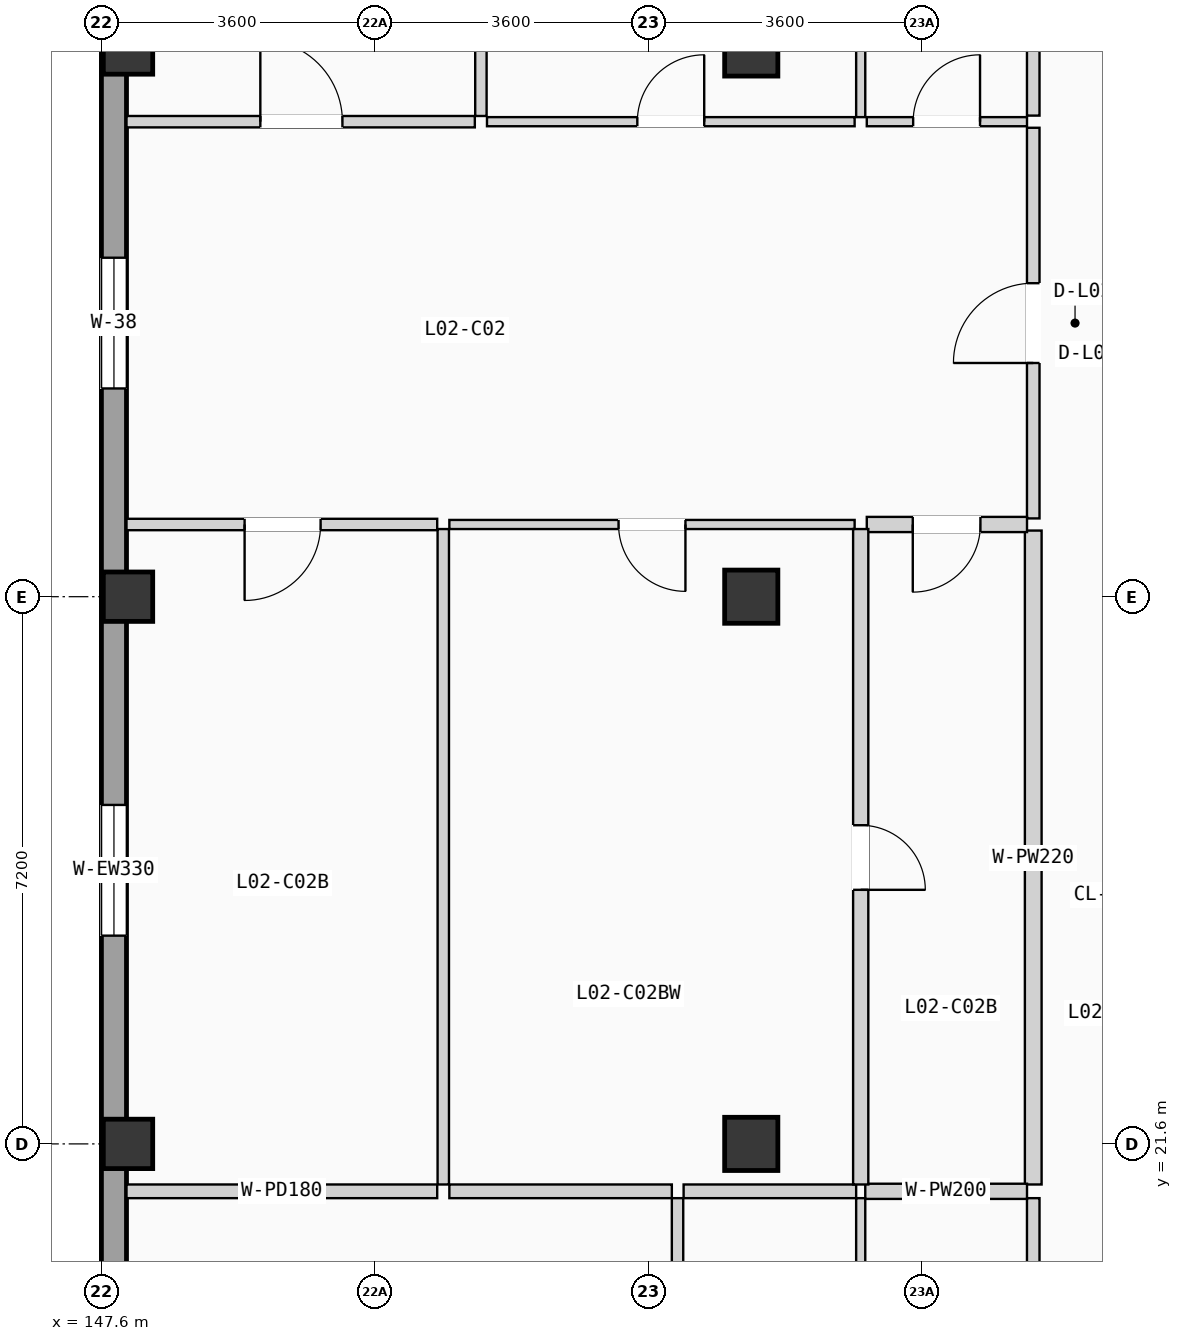
"""IFC4 building model, lengths in metres.
Left out: names, types, materials, properties, quantities, classifications, styles, units other than length and angle.
Written with IfcOpenShell. Run it as: python <this file> out.ifc"""

import sys

from ifc_helpers import new_model, si_unit, direction, frame, frame_2d, origin, origin_2d, place, context, subcontext, project, spatial, rectangle, extrude, element, fill, save


model = new_model("IFC4")
c1 = context("Model", 3, precision=1e-05, world=origin(), true_north=direction((0.0, 1.0)))
c2 = subcontext(c1, "Body", "Model", "MODEL_VIEW")
j1 = project(units=[si_unit("LENGTHUNIT", "METRE"), si_unit("PLANEANGLEUNIT", "RADIAN")], contexts=[c1])
p1 = place(None, origin())
s1 = spatial("IfcSite", under=j1, at=p1, CompositionType="ELEMENT")
p2 = place(p1, origin())
s2 = spatial("IfcBuilding", under=s1, at=p2, CompositionType="ELEMENT")
p3 = place(p2, frame((0.0, 0.0, 8.575)))
s3 = spatial("IfcBuildingStorey", under=s2, at=p3, CompositionType="ELEMENT", Elevation=8.575)
for number, where, z_axis, x_axis in (
    (1, (147.95, 21.6, 0.0), (0.0, 0.0, 1.0), (1.0, 0.0, 0.0)),
    (2, (147.95, 28.8, 0.0), (0.0, 0.0, 1.0), (1.0, 0.0, 0.0)),
    (3, (147.95, 36.0, 0.0), (0.0, 0.0, 1.0), (1.0, 0.0, 0.0)),
):
    element("IfcColumn", number, at=place(p3, frame(where, z_axis=z_axis, x_axis=x_axis)), inside=s3, PredefinedType="COLUMN", context=c2, shape_type="SweptSolid", body=[
        extrude(rectangle(XDim=0.65, YDim=0.65, at=origin_2d()), origin(), (0.0, 0.0, 1.0), 3.5),
    ])
for number, where, z_axis, x_axis in (
    (4, (156.15, 21.6, 0.0), (0.0, 0.0, 1.0), (1.0, 0.0, 0.0)),
    (5, (156.15, 28.8, 0.0), (0.0, 0.0, 1.0), (1.0, 0.0, 0.0)),
    (6, (156.15, 36.0, 0.0), (0.0, 0.0, 1.0), (1.0, 0.0, 0.0)),
):
    element("IfcColumn", number, at=place(p3, frame(where, z_axis=z_axis, x_axis=x_axis)), inside=s3, PredefinedType="COLUMN", context=c2, shape_type="SweptSolid", body=[
        extrude(rectangle(XDim=0.7, YDim=0.7, at=origin_2d()), origin(), (0.0, 0.0, 1.0), 3.5),
    ])
p4 = place(p3, frame((147.765, 0.33, 0.0), z_axis=(0.0, 0.0, 1.0), x_axis=(0.0, 1.0, 0.0)))
e7 = element("IfcWall", 7, at=p4, inside=s3, PredefinedType="SOLIDWALL", context=c2, shape_type="SweptSolid", body=[
    extrude(rectangle(XDim=49.74, YDim=0.33, at=frame_2d((24.87, 0.0))), origin(), (0.0, 0.0, 1.0), 3.24),
])
p5 = place(p4, frame((11.834, 0.0, 0.755)))
e8 = element("IfcOpeningElement", 8, at=p5, cuts=e7, PredefinedType="OPENING", context=c2, shape_type="SweptSolid", body=[
    extrude(rectangle(XDim=1.6, YDim=1.8, at=frame_2d((0.8, 0.9))), frame((0.0, 0.175, 0.0), z_axis=(0.0, -1.0, 0.0), x_axis=(1.0, 0.0, 0.0)), (0.0, 0.0, 1.0), 0.35),
])
p6 = place(p4, frame((8.429, 0.0, 0.9)))
e9 = element("IfcOpeningElement", 9, at=p6, cuts=e7, PredefinedType="OPENING", context=c2, shape_type="SweptSolid", body=[
    extrude(rectangle(XDim=1.72, YDim=1.2, at=frame_2d((0.86, 0.6))), frame((0.0, 0.175, 0.0), z_axis=(0.0, -1.0, 0.0), x_axis=(1.0, 0.0, 0.0)), (0.0, 0.0, 1.0), 0.35),
])
p7 = place(p4, frame((17.677, 0.0, 0.9)))
e10 = element("IfcOpeningElement", 10, at=p7, cuts=e7, PredefinedType="OPENING", context=c2, shape_type="SweptSolid", body=[
    extrude(rectangle(XDim=1.72, YDim=1.35, at=frame_2d((0.86, 0.675))), frame((0.0, 0.175, 0.0), z_axis=(0.0, -1.0, 0.0), x_axis=(1.0, 0.0, 0.0)), (0.0, 0.0, 1.0), 0.35),
])
p8 = place(p4, frame((31.21, 0.0, 0.9)))
e11 = element("IfcOpeningElement", 11, at=p8, cuts=e7, PredefinedType="OPENING", context=c2, shape_type="SweptSolid", body=[
    extrude(rectangle(XDim=1.72, YDim=1.5, at=frame_2d((0.86, 0.75))), frame((0.0, 0.175, 0.0), z_axis=(0.0, -1.0, 0.0), x_axis=(1.0, 0.0, 0.0)), (0.0, 0.0, 1.0), 0.35),
])
p9 = place(p4, frame((24.01, 0.0, 0.9)))
e12 = element("IfcOpeningElement", 12, at=p9, cuts=e7, PredefinedType="OPENING", context=c2, shape_type="SweptSolid", body=[
    extrude(rectangle(XDim=1.72, YDim=1.65, at=frame_2d((0.86, 0.825))), frame((0.0, 0.175, 0.0), z_axis=(0.0, -1.0, 0.0), x_axis=(1.0, 0.0, 0.0)), (0.0, 0.0, 1.0), 0.35),
])
p10 = place(p4, frame((38.345, 0.0, 0.755)))
e13 = element("IfcOpeningElement", 13, at=p10, cuts=e7, PredefinedType="OPENING", context=c2, shape_type="SweptSolid", body=[
    extrude(rectangle(XDim=1.72, YDim=1.8, at=frame_2d((0.86, 0.9))), frame((0.0, 0.175, 0.0), z_axis=(0.0, -1.0, 0.0), x_axis=(1.0, 0.0, 0.0)), (0.0, 0.0, 1.0), 0.35),
])
p11 = place(p3, frame((159.86, 16.847, 0.0), z_axis=(0.0, 0.0, 1.0), x_axis=(0.0, 1.0, 0.0)))
e14 = element("IfcWall", 14, at=p11, inside=s3, PredefinedType="PARTITIONING", context=c2, shape_type="SweptSolid", body=[
    extrude(rectangle(XDim=4.039, YDim=0.165, at=frame_2d((2.02, 0.0))), origin(), (0.0, 0.0, 1.0), 3.22),
])
p12 = place(p3, frame((159.86, 29.83, 0.0), z_axis=(0.0, 0.0, 1.0), x_axis=(0.0, 1.0, 0.0)))
e15 = element("IfcWall", 15, at=p12, inside=s3, PredefinedType="PARTITIONING", context=c2, shape_type="SweptSolid", body=[
    extrude(rectangle(XDim=5.14, YDim=0.165, at=frame_2d((2.57, 0.0))), origin(), (0.0, 0.0, 1.0), 3.22),
])
p13 = place(p12, frame((2.045, 0.0, 0.0)))
e16 = element("IfcOpeningElement", 16, at=p13, cuts=e15, PredefinedType="OPENING", context=c2, shape_type="SweptSolid", body=[
    extrude(rectangle(XDim=1.05, YDim=2.13, at=frame_2d((0.525, 1.065))), frame((0.0, 0.093, 0.0), z_axis=(0.0, -1.0, 0.0), x_axis=(1.0, 0.0, 0.0)), (0.0, 0.0, 1.0), 0.185),
])
p14 = place(p3, frame((159.86, 21.066, 0.0), z_axis=(0.0, 0.0, 1.0), x_axis=(0.0, 1.0, 0.0)))
e17 = element("IfcWall", 17, at=p14, inside=s3, PredefinedType="PLUMBINGWALL", context=c2, shape_type="SweptSolid", body=[
    extrude(rectangle(XDim=8.604, YDim=0.22, at=frame_2d((4.302, 0.0))), origin(), (0.0, 0.0, 1.0), 3.22),
])
p15 = place(p3, frame((159.86, 35.13, 0.0), z_axis=(0.0, 0.0, 1.0), x_axis=(0.0, 1.0, 0.0)))
e18 = element("IfcWall", 18, at=p15, inside=s3, PredefinedType="PARTITIONING", context=c2, shape_type="SweptSolid", body=[
    extrude(rectangle(XDim=7.67, YDim=0.165, at=frame_2d((3.835, 0.0))), origin(), (0.0, 0.0, 1.0), 3.22),
])
p16 = place(p3, frame((157.59, 16.827, 0.0), z_axis=(0.0, 0.0, 1.0), x_axis=(0.0, 1.0, 0.0)))
e19 = element("IfcWall", 19, at=p16, inside=s3, PredefinedType="PARTITIONING", context=c2, shape_type="SweptSolid", body=[
    extrude(rectangle(XDim=4.059, YDim=0.12, at=frame_2d((2.03, 0.0))), origin(), (0.0, 0.0, 1.0), 3.22),
])
p17 = place(p3, frame((157.65, 20.976, 0.0), z_axis=(0.0, 0.0, 1.0), x_axis=(1.0, 0.0, 0.0)))
e20 = element("IfcWall", 20, at=p17, inside=s3, PredefinedType="PLUMBINGWALL", context=c2, shape_type="SweptSolid", body=[
    extrude(rectangle(XDim=2.128, YDim=0.2, at=frame_2d((1.064, 0.0))), origin(), (0.0, 0.0, 1.0), 3.22),
])
p18 = place(p3, frame((155.18, 16.842, 0.0), z_axis=(0.0, 0.0, 1.0), x_axis=(0.0, 1.0, 0.0)))
e21 = element("IfcWall", 21, at=p18, inside=s3, PredefinedType="PARTITIONING", context=c2, shape_type="SweptSolid", body=[
    extrude(rectangle(XDim=4.044, YDim=0.15, at=frame_2d((2.022, 0.0))), origin(), (0.0, 0.0, 1.0), 3.22),
])
p19 = place(p3, frame((147.93, 20.976, 0.0), z_axis=(0.0, 0.0, 1.0), x_axis=(1.0, 0.0, 0.0)))
e22 = element("IfcWall", 22, at=p19, inside=s3, PredefinedType="PARTITIONING", context=c2, shape_type="SweptSolid", body=[
    extrude(rectangle(XDim=4.088, YDim=0.18, at=frame_2d((2.044, 0.0))), origin(), (0.0, 0.0, 1.0), 3.22),
])
p20 = place(p3, frame((152.178, 20.976, 0.0), z_axis=(0.0, 0.0, 1.0), x_axis=(1.0, 0.0, 0.0)))
e23 = element("IfcWall", 23, at=p20, inside=s3, PredefinedType="PARTITIONING", context=c2, shape_type="SweptSolid", body=[
    extrude(rectangle(XDim=2.927, YDim=0.18, at=frame_2d((1.463, 0.0))), origin(), (0.0, 0.0, 1.0), 3.22),
])
p21 = place(p3, frame((155.26, 20.976, 0.0), z_axis=(0.0, 0.0, 1.0), x_axis=(1.0, 0.0, 0.0)))
e24 = element("IfcWall", 24, at=p21, inside=s3, PredefinedType="PARTITIONING", context=c2, shape_type="SweptSolid", body=[
    extrude(rectangle(XDim=2.27, YDim=0.18, at=frame_2d((1.135, 0.0))), origin(), (0.0, 0.0, 1.0), 3.22),
])
p22 = place(p3, frame((157.67, 29.75, 0.0), z_axis=(0.0, 0.0, 1.0), x_axis=(1.0, 0.0, 0.0)))
e25 = element("IfcWall", 25, at=p22, inside=s3, PredefinedType="PLUMBINGWALL", context=c2, shape_type="SweptSolid", body=[
    extrude(rectangle(XDim=2.108, YDim=0.2, at=frame_2d((1.054, 0.0))), origin(), (0.0, 0.0, 1.0), 3.22),
])
p23 = place(p22, frame((0.605, 0.0, 0.0)))
e26 = element("IfcOpeningElement", 26, at=p23, cuts=e25, PredefinedType="OPENING", context=c2, shape_type="SweptSolid", body=[
    extrude(rectangle(XDim=0.89, YDim=2.03, at=frame_2d((0.445, 1.015))), frame((0.0, 0.11, 0.0), z_axis=(0.0, -1.0, 0.0), x_axis=(1.0, 0.0, 0.0)), (0.0, 0.0, 1.0), 0.22),
])
p24 = place(p3, frame((157.67, 35.05, 0.0), z_axis=(0.0, 0.0, 1.0), x_axis=(1.0, 0.0, 0.0)))
e27 = element("IfcWall", 27, at=p24, inside=s3, PredefinedType="PARTITIONING", context=c2, shape_type="SweptSolid", body=[
    extrude(rectangle(XDim=2.108, YDim=0.12, at=frame_2d((1.054, 0.0))), origin(), (0.0, 0.0, 1.0), 3.22),
])
p25 = place(p24, frame((0.61, 0.0, 0.0)))
e28 = element("IfcOpeningElement", 28, at=p25, cuts=e27, PredefinedType="OPENING", context=c2, shape_type="SweptSolid", body=[
    extrude(rectangle(XDim=0.88, YDim=2.02, at=frame_2d((0.44, 1.01))), frame((0.0, 0.07, 0.0), z_axis=(0.0, -1.0, 0.0), x_axis=(1.0, 0.0, 0.0)), (0.0, 0.0, 1.0), 0.14),
])
p26 = place(p3, frame((147.93, 29.75, 0.0), z_axis=(0.0, 0.0, 1.0), x_axis=(1.0, 0.0, 0.0)))
e29 = element("IfcWall", 29, at=p26, inside=s3, PredefinedType="PARTITIONING", context=c2, shape_type="SweptSolid", body=[
    extrude(rectangle(XDim=4.088, YDim=0.15, at=frame_2d((2.044, 0.0))), origin(), (0.0, 0.0, 1.0), 3.22),
])
p27 = place(p26, frame((1.554, 0.0, 0.0)))
e30 = element("IfcOpeningElement", 30, at=p27, cuts=e29, PredefinedType="OPENING", context=c2, shape_type="SweptSolid", body=[
    extrude(rectangle(XDim=1.0, YDim=2.06, at=frame_2d((0.5, 1.03))), frame((0.0, 0.085, 0.0), z_axis=(0.0, -1.0, 0.0), x_axis=(1.0, 0.0, 0.0)), (0.0, 0.0, 1.0), 0.17),
])
p28 = place(p3, frame((152.178, 29.75, 0.0), z_axis=(0.0, 0.0, 1.0), x_axis=(1.0, 0.0, 0.0)))
e31 = element("IfcWall", 31, at=p28, inside=s3, PredefinedType="PARTITIONING", context=c2, shape_type="SweptSolid", body=[
    extrude(rectangle(XDim=5.332, YDim=0.12, at=frame_2d((2.666, 0.0))), origin(), (0.0, 0.0, 1.0), 3.22),
])
p29 = place(p28, frame((2.226, 0.0, 0.0)))
e32 = element("IfcOpeningElement", 32, at=p29, cuts=e31, PredefinedType="OPENING", context=c2, shape_type="SweptSolid", body=[
    extrude(rectangle(XDim=0.88, YDim=2.02, at=frame_2d((0.44, 1.01))), frame((0.0, 0.07, 0.0), z_axis=(0.0, -1.0, 0.0), x_axis=(1.0, 0.0, 0.0)), (0.0, 0.0, 1.0), 0.14),
])
p30 = place(p3, frame((147.93, 35.05, 0.0), z_axis=(0.0, 0.0, 1.0), x_axis=(1.0, 0.0, 0.0)))
e33 = element("IfcWall", 33, at=p30, inside=s3, PredefinedType="PARTITIONING", context=c2, shape_type="SweptSolid", body=[
    extrude(rectangle(XDim=4.583, YDim=0.15, at=frame_2d((2.292, 0.0))), origin(), (0.0, 0.0, 1.0), 3.22),
])
p31 = place(p30, frame((1.761, 0.0, 0.0)))
e34 = element("IfcOpeningElement", 34, at=p31, cuts=e33, PredefinedType="OPENING", context=c2, shape_type="SweptSolid", body=[
    extrude(rectangle(XDim=1.08, YDim=2.1, at=frame_2d((0.54, 1.05))), frame((0.0, 0.085, 0.0), z_axis=(0.0, -1.0, 0.0), x_axis=(1.0, 0.0, 0.0)), (0.0, 0.0, 1.0), 0.17),
])
p32 = place(p3, frame((152.673, 35.05, 0.0), z_axis=(0.0, 0.0, 1.0), x_axis=(1.0, 0.0, 0.0)))
e35 = element("IfcWall", 35, at=p32, inside=s3, PredefinedType="PARTITIONING", context=c2, shape_type="SweptSolid", body=[
    extrude(rectangle(XDim=4.837, YDim=0.12, at=frame_2d((2.418, 0.0))), origin(), (0.0, 0.0, 1.0), 3.22),
])
p33 = place(p32, frame((1.978, 0.0, 0.0)))
e36 = element("IfcOpeningElement", 36, at=p33, cuts=e35, PredefinedType="OPENING", context=c2, shape_type="SweptSolid", body=[
    extrude(rectangle(XDim=0.88, YDim=2.02, at=frame_2d((0.44, 1.01))), frame((0.0, 0.07, 0.0), z_axis=(0.0, -1.0, 0.0), x_axis=(1.0, 0.0, 0.0)), (0.0, 0.0, 1.0), 0.14),
])
p34 = place(p3, frame((157.59, 21.066, 0.0), z_axis=(0.0, 0.0, 1.0), x_axis=(0.0, 1.0, 0.0)))
e37 = element("IfcWall", 37, at=p34, inside=s3, PredefinedType="PLUMBINGWALL", context=c2, shape_type="SweptSolid", body=[
    extrude(rectangle(XDim=8.624, YDim=0.2, at=frame_2d((4.312, 0.0))), origin(), (0.0, 0.0, 1.0), 3.22),
])
p35 = place(p34, frame((3.877, 0.0, 0.0)))
e38 = element("IfcOpeningElement", 38, at=p35, cuts=e37, PredefinedType="OPENING", context=c2, shape_type="SweptSolid", body=[
    extrude(rectangle(XDim=0.85, YDim=2.01, at=frame_2d((0.425, 1.005))), frame((0.0, 0.11, 0.0), z_axis=(0.0, -1.0, 0.0), x_axis=(1.0, 0.0, 0.0)), (0.0, 0.0, 1.0), 0.22),
])
p36 = place(p3, frame((157.59, 35.11, 0.0), z_axis=(0.0, 0.0, 1.0), x_axis=(0.0, 1.0, 0.0)))
e39 = element("IfcWall", 39, at=p36, inside=s3, PredefinedType="PARTITIONING", context=c2, shape_type="SweptSolid", body=[
    extrude(rectangle(XDim=7.69, YDim=0.12, at=frame_2d((3.845, 0.0))), origin(), (0.0, 0.0, 1.0), 3.22),
])
p37 = place(p3, frame((152.098, 21.066, 0.0), z_axis=(0.0, 0.0, 1.0), x_axis=(0.0, 1.0, 0.0)))
e40 = element("IfcWall", 40, at=p37, inside=s3, PredefinedType="PARTITIONING", context=c2, shape_type="SweptSolid", body=[
    extrude(rectangle(XDim=8.624, YDim=0.15, at=frame_2d((4.312, 0.0))), origin(), (0.0, 0.0, 1.0), 3.22),
])
p38 = place(p3, frame((152.593, 35.125, 0.0), z_axis=(0.0, 0.0, 1.0), x_axis=(0.0, 1.0, 0.0)))
e41 = element("IfcWall", 41, at=p38, inside=s3, PredefinedType="PARTITIONING", context=c2, shape_type="SweptSolid", body=[
    extrude(rectangle(XDim=7.675, YDim=0.15, at=frame_2d((3.837, 0.0))), origin(), (0.0, 0.0, 1.0), 3.22),
])
p39 = place(p8, origin())
e42 = element("IfcWindow", 42, at=p39, inside=s3, PartitioningType="DOUBLE_PANEL_VERTICAL", PredefinedType="WINDOW", context=c2, shape_type="SweptSolid", body=[
    extrude(rectangle(XDim=1.72, YDim=1.5, at=frame_2d((0.86, 0.75))), frame((0.0, 0.03, 0.0), z_axis=(0.0, -1.0, 0.0), x_axis=(1.0, 0.0, 0.0)), (0.0, 0.0, 1.0), 0.06),
])
fill(e11, e42)
p40 = place(p9, origin())
e43 = element("IfcWindow", 43, at=p40, inside=s3, PartitioningType="DOUBLE_PANEL_VERTICAL", PredefinedType="WINDOW", context=c2, shape_type="SweptSolid", body=[
    extrude(rectangle(XDim=1.72, YDim=1.65, at=frame_2d((0.86, 0.825))), frame((0.0, 0.03, 0.0), z_axis=(0.0, -1.0, 0.0), x_axis=(1.0, 0.0, 0.0)), (0.0, 0.0, 1.0), 0.06),
])
fill(e12, e43)
p41 = place(p13, origin())
e44 = element("IfcDoor", 44, at=p41, inside=s3, OperationType="SINGLE_SWING_LEFT", PredefinedType="DOOR", context=c2, shape_type="SweptSolid", body=[
    extrude(rectangle(XDim=1.05, YDim=2.13, at=frame_2d((0.525, 1.065))), frame((0.0, 0.025, 0.0), z_axis=(0.0, -1.0, 0.0), x_axis=(1.0, 0.0, 0.0)), (0.0, 0.0, 1.0), 0.05),
])
fill(e16, e44)
p42 = place(p23, frame((0.89, 0.0, 0.0), z_axis=(0.0, 0.0, 1.0), x_axis=(-1.0, 0.0, 0.0)))
e45 = element("IfcDoor", 45, at=p42, inside=s3, OperationType="SINGLE_SWING_LEFT", PredefinedType="DOOR", context=c2, shape_type="SweptSolid", body=[
    extrude(rectangle(XDim=0.89, YDim=2.03, at=frame_2d((0.445, 1.015))), frame((0.0, 0.025, 0.0), z_axis=(0.0, -1.0, 0.0), x_axis=(1.0, 0.0, 0.0)), (0.0, 0.0, 1.0), 0.05),
])
fill(e26, e45)
p43 = place(p25, origin())
e46 = element("IfcDoor", 46, at=p43, inside=s3, OperationType="SINGLE_SWING_RIGHT", PredefinedType="DOOR", context=c2, shape_type="SweptSolid", body=[
    extrude(rectangle(XDim=0.88, YDim=2.02, at=frame_2d((0.44, 1.01))), frame((0.0, 0.025, 0.0), z_axis=(0.0, -1.0, 0.0), x_axis=(1.0, 0.0, 0.0)), (0.0, 0.0, 1.0), 0.05),
])
fill(e28, e46)
p44 = place(p27, frame((1.0, 0.0, 0.0), z_axis=(0.0, 0.0, 1.0), x_axis=(-1.0, 0.0, 0.0)))
e47 = element("IfcDoor", 47, at=p44, inside=s3, OperationType="SINGLE_SWING_LEFT", PredefinedType="DOOR", context=c2, shape_type="SweptSolid", body=[
    extrude(rectangle(XDim=1.0, YDim=2.06, at=frame_2d((0.5, 1.03))), frame((0.0, 0.025, 0.0), z_axis=(0.0, -1.0, 0.0), x_axis=(1.0, 0.0, 0.0)), (0.0, 0.0, 1.0), 0.05),
])
fill(e30, e47)
p45 = place(p29, frame((0.88, 0.0, 0.0), z_axis=(0.0, 0.0, 1.0), x_axis=(-1.0, 0.0, 0.0)))
e48 = element("IfcDoor", 48, at=p45, inside=s3, OperationType="SINGLE_SWING_RIGHT", PredefinedType="DOOR", context=c2, shape_type="SweptSolid", body=[
    extrude(rectangle(XDim=0.88, YDim=2.02, at=frame_2d((0.44, 1.01))), frame((0.0, 0.025, 0.0), z_axis=(0.0, -1.0, 0.0), x_axis=(1.0, 0.0, 0.0)), (0.0, 0.0, 1.0), 0.05),
])
fill(e32, e48)
p46 = place(p31, origin())
e49 = element("IfcDoor", 49, at=p46, inside=s3, OperationType="SINGLE_SWING_LEFT", PredefinedType="DOOR", context=c2, shape_type="SweptSolid", body=[
    extrude(rectangle(XDim=1.08, YDim=2.1, at=frame_2d((0.54, 1.05))), frame((0.0, 0.025, 0.0), z_axis=(0.0, -1.0, 0.0), x_axis=(1.0, 0.0, 0.0)), (0.0, 0.0, 1.0), 0.05),
])
fill(e34, e49)
p47 = place(p33, origin())
e50 = element("IfcDoor", 50, at=p47, inside=s3, OperationType="SINGLE_SWING_RIGHT", PredefinedType="DOOR", context=c2, shape_type="SweptSolid", body=[
    extrude(rectangle(XDim=0.88, YDim=2.02, at=frame_2d((0.44, 1.01))), frame((0.0, 0.025, 0.0), z_axis=(0.0, -1.0, 0.0), x_axis=(1.0, 0.0, 0.0)), (0.0, 0.0, 1.0), 0.05),
])
fill(e36, e50)
p48 = place(p35, frame((0.85, 0.0, 0.0), z_axis=(0.0, 0.0, 1.0), x_axis=(-1.0, 0.0, 0.0)))
e51 = element("IfcDoor", 51, at=p48, inside=s3, OperationType="SINGLE_SWING_LEFT", PredefinedType="DOOR", context=c2, shape_type="SweptSolid", body=[
    extrude(rectangle(XDim=0.85, YDim=2.01, at=frame_2d((0.425, 1.005))), frame((0.0, 0.025, 0.0), z_axis=(0.0, -1.0, 0.0), x_axis=(1.0, 0.0, 0.0)), (0.0, 0.0, 1.0), 0.05),
])
fill(e38, e51)
save(model, sys.argv[1])
